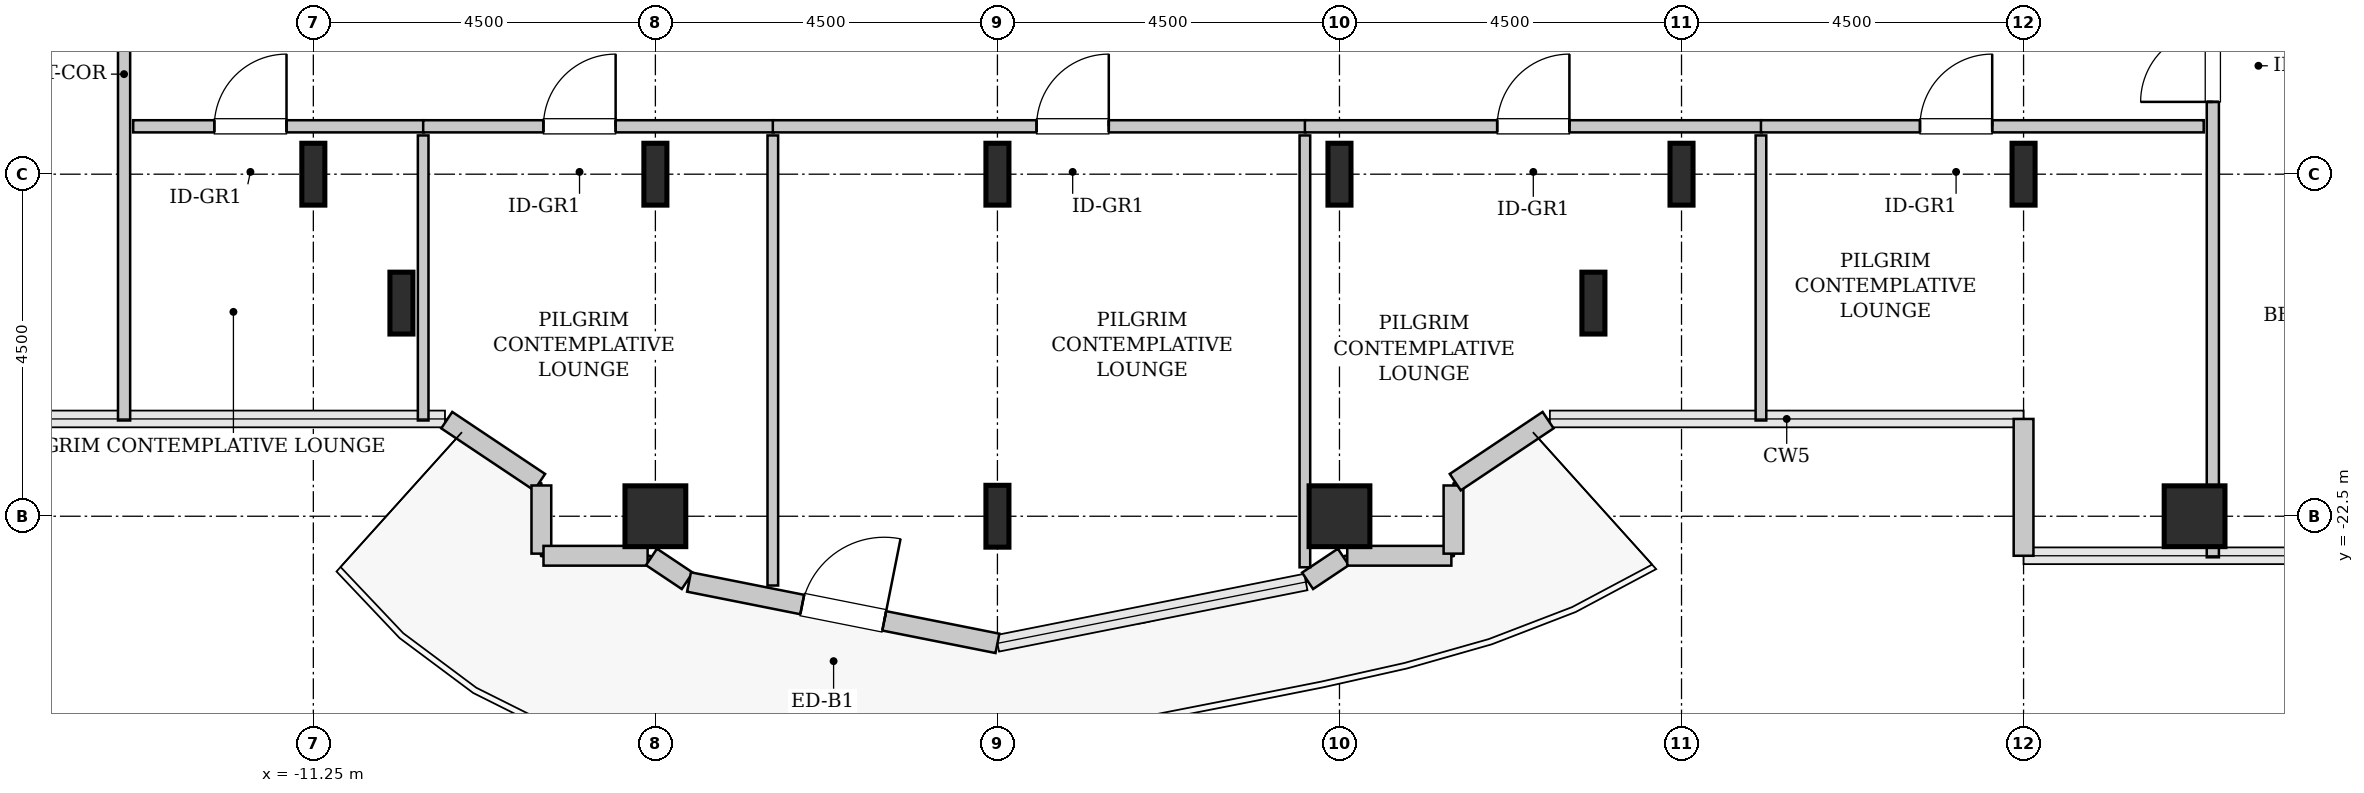
"""IFC4 building model, lengths in metres.
Left out: names, types, materials, properties, quantities, classifications, styles, units other than length and angle.
Written with IfcOpenShell. Run it as: python <this file> out.ifc"""

import sys

from ifc_helpers import new_model, si_unit, direction, frame, frame_2d, origin, origin_2d, place, context, subcontext, project, spatial, rectangle, hollow_rectangle, i_section, extrude, source, transform, mapped, element, fill, save


model = new_model("IFC4")
c1 = context("Model", 3, precision=1e-05, world=origin(), true_north=direction((0.0, 1.0)))
c2 = subcontext(c1, "Body", "Model", "MODEL_VIEW")
j1 = project(units=[si_unit("LENGTHUNIT", "METRE"), si_unit("PLANEANGLEUNIT", "RADIAN")], contexts=[c1])
p1 = place(None, origin())
s1 = spatial("IfcSite", under=j1, at=p1, CompositionType="ELEMENT")
p2 = place(p1, origin())
s2 = spatial("IfcBuilding", under=s1, at=p2, CompositionType="ELEMENT")
p3 = place(p2, frame((0.0, 0.0, 179.2)))
s3 = spatial("IfcBuildingStorey", under=s2, at=p3, CompositionType="ELEMENT", Elevation=179.2)
m1 = source(origin(), c2, "Body", "SweptSolid", [
    extrude(i_section(OverallWidth=0.303, OverallDepth=0.814, WebThickness=0.021, FlangeThickness=0.04, FilletRadius=0.03, at=origin_2d()), origin(), (0.0, 0.0, 1.0), 3.8),
])
for number, where, z_axis, x_axis in (
    (1, (-11.25, -18.0, 0.0), (0.0, 0.0, 1.0), (1.0, 0.0, 0.0)),
    (2, (-10.091, -19.696, 0.0), (0.0, 0.0, 1.0), (1.0, 0.0, 0.0)),
):
    element("IfcColumn", number, at=place(p3, frame(where, z_axis=z_axis, x_axis=x_axis)), inside=s3, PredefinedType="COLUMN", context=c2, shape_type="MappedRepresentation", body=[
        mapped(m1, transform((0.0, 0.0, 0.0), x_axis=(1.0, 0.0, 0.0), y_axis=(0.0, 1.0, 0.0), z_axis=(0.0, 0.0, 1.0), scale=1.0)),
    ])
m2 = source(origin(), c2, "Body", "SweptSolid", [
    extrude(hollow_rectangle(XDim=0.8, YDim=0.8, WallThickness=0.04, InnerFilletRadius=0.04, OuterFilletRadius=0.08, at=origin_2d()), origin(), (0.0, 0.0, 1.0), 3.8),
])
p4 = place(p3, frame((-6.75, -22.5, 0.0), z_axis=(0.0, 0.0, 1.0), x_axis=(1.0, 0.0, 0.0)))
e3 = element("IfcColumn", 3, at=p4, inside=s3, PredefinedType="COLUMN", context=c2, shape_type="MappedRepresentation", body=[
    mapped(m2, transform((0.0, 0.0, 0.0), x_axis=(1.0, 0.0, 0.0), y_axis=(0.0, 1.0, 0.0), z_axis=(0.0, 0.0, 1.0), scale=1.0)),
])
for number, where, z_axis, x_axis in (
    (4, (-6.75, -18.0, 0.0), (0.0, 0.0, 1.0), (1.0, 0.0, 0.0)),
    (5, (-2.25, -22.5, 0.0), (0.0, 0.0, 1.0), (1.0, 0.0, 0.0)),
    (6, (-2.25, -18.0, 0.0), (0.0, 0.0, 1.0), (1.0, 0.0, 0.0)),
):
    element("IfcColumn", number, at=place(p3, frame(where, z_axis=z_axis, x_axis=x_axis)), inside=s3, PredefinedType="COLUMN", context=c2, shape_type="MappedRepresentation", body=[
        mapped(m1, transform((0.0, 0.0, 0.0), x_axis=(1.0, 0.0, 0.0), y_axis=(0.0, 1.0, 0.0), z_axis=(0.0, 0.0, 1.0), scale=1.0)),
    ])
p5 = place(p3, frame((2.25, -22.5, 0.0), z_axis=(0.0, 0.0, 1.0), x_axis=(1.0, 0.0, 0.0)))
e7 = element("IfcColumn", 7, at=p5, inside=s3, PredefinedType="COLUMN", context=c2, shape_type="MappedRepresentation", body=[
    mapped(m2, transform((0.0, 0.0, 0.0), x_axis=(1.0, 0.0, 0.0), y_axis=(0.0, 1.0, 0.0), z_axis=(0.0, 0.0, 1.0), scale=1.0)),
])
for number, where, z_axis, x_axis in (
    (8, (2.25, -18.0, 0.0), (0.0, 0.0, 1.0), (1.0, 0.0, 0.0)),
    (9, (5.591, -19.696, 0.0), (0.0, 0.0, 1.0), (1.0, 0.0, 0.0)),
    (10, (6.75, -18.0, 0.0), (0.0, 0.0, 1.0), (1.0, 0.0, 0.0)),
    (11, (11.25, -18.0, 0.0), (0.0, 0.0, 1.0), (1.0, 0.0, 0.0)),
):
    element("IfcColumn", number, at=place(p3, frame(where, z_axis=z_axis, x_axis=x_axis)), inside=s3, PredefinedType="COLUMN", context=c2, shape_type="MappedRepresentation", body=[
        mapped(m1, transform((0.0, 0.0, 0.0), x_axis=(1.0, 0.0, 0.0), y_axis=(0.0, 1.0, 0.0), z_axis=(0.0, 0.0, 1.0), scale=1.0)),
    ])
p6 = place(p3, frame((13.5, -22.5, 0.0), z_axis=(0.0, 0.0, 1.0), x_axis=(1.0, 0.0, 0.0)))
e12 = element("IfcColumn", 12, at=p6, inside=s3, PredefinedType="COLUMN", context=c2, shape_type="MappedRepresentation", body=[
    mapped(m2, transform((0.0, 0.0, 0.0), x_axis=(1.0, 0.0, 0.0), y_axis=(0.0, 1.0, 0.0), z_axis=(0.0, 0.0, 1.0), scale=1.0)),
])
m3 = source(origin(), c2, "Body", "SweptSolid", [
    extrude(rectangle(XDim=1.8, YDim=0.26, at=frame_2d((0.9, 0.0))), origin(), (0.0, 0.0, 1.0), 3.55),
])
p7 = place(p3, frame((11.25, -21.22, 0.0), z_axis=(0.0, 0.0, 1.0), x_axis=(0.0, -1.0, 0.0)))
e13 = element("IfcWall", 13, at=p7, inside=s3, PredefinedType="SOLIDWALL", context=c2, shape_type="MappedRepresentation", body=[
    mapped(m3, transform((0.0, 0.0, 0.0), x_axis=(1.0, 0.0, 0.0), y_axis=(0.0, 1.0, 0.0), z_axis=(0.0, 0.0, 1.0), scale=1.0)),
])
m4 = source(origin(), c2, "Body", "SweptSolid", [
    extrude(rectangle(XDim=1.469, YDim=0.26, at=frame_2d((0.734, 0.0))), origin(), (0.0, 0.0, 1.0), 3.55),
])
p8 = place(p3, frame((-9.495, -21.236, 0.0), z_axis=(0.0, 0.0, 1.0), x_axis=(0.831461760506, -0.555581983884, 0.0)))
e14 = element("IfcWall", 14, at=p8, inside=s3, PredefinedType="SOLIDWALL", context=c2, shape_type="MappedRepresentation", body=[
    mapped(m4, transform((0.0, 0.0, 0.0), x_axis=(1.0, 0.0, 0.0), y_axis=(0.0, 1.0, 0.0), z_axis=(0.0, 0.0, 1.0), scale=1.0)),
])
m5 = source(origin(), c2, "Body", "SweptSolid", [
    extrude(rectangle(XDim=0.897, YDim=0.26, at=frame_2d((0.448, 0.0))), origin(), (0.0, 0.0, 1.0), 3.55),
])
p9 = place(p3, frame((-8.25, -22.095, 0.0), z_axis=(0.0, 0.0, 1.0), x_axis=(0.0, -1.0, 0.0)))
e15 = element("IfcWall", 15, at=p9, inside=s3, PredefinedType="SOLIDWALL", context=c2, shape_type="MappedRepresentation", body=[
    mapped(m5, transform((0.0, 0.0, 0.0), x_axis=(1.0, 0.0, 0.0), y_axis=(0.0, 1.0, 0.0), z_axis=(0.0, 0.0, 1.0), scale=1.0)),
])
m6 = source(origin(), c2, "Body", "SweptSolid", [
    extrude(rectangle(XDim=1.37, YDim=0.26, at=frame_2d((0.685, 0.0))), origin(), (0.0, 0.0, 1.0), 3.55),
])
p10 = place(p3, frame((-8.222, -23.02, 0.0), z_axis=(0.0, 0.0, 1.0), x_axis=(1.0, 0.0, 0.0)))
e16 = element("IfcWall", 16, at=p10, inside=s3, PredefinedType="SOLIDWALL", context=c2, shape_type="MappedRepresentation", body=[
    mapped(m6, transform((0.0, 0.0, 0.0), x_axis=(1.0, 0.0, 0.0), y_axis=(0.0, 1.0, 0.0), z_axis=(0.0, 0.0, 1.0), scale=1.0)),
])
m7 = source(origin(), c2, "Body", "SweptSolid", [
    extrude(rectangle(XDim=0.565, YDim=0.26, at=frame_2d((0.283, 0.0))), origin(), (0.0, 0.0, 1.0), 3.55),
])
p11 = place(p3, frame((-6.801, -23.036, 0.0), z_axis=(0.0, 0.0, 1.0), x_axis=(0.831651492666, -0.555297933317, 0.0)))
e17 = element("IfcWall", 17, at=p11, inside=s3, PredefinedType="SOLIDWALL", context=c2, shape_type="MappedRepresentation", body=[
    mapped(m7, transform((0.0, 0.0, 0.0), x_axis=(1.0, 0.0, 0.0), y_axis=(0.0, 1.0, 0.0), z_axis=(0.0, 0.0, 1.0), scale=1.0)),
])
m8 = source(origin(), c2, "Body", "SweptSolid", [
    extrude(rectangle(XDim=4.137, YDim=0.26, at=frame_2d((2.068, 0.0))), origin(), (0.0, 0.0, 1.0), 3.55),
])
p12 = place(p3, frame((-6.307, -23.365, 0.0), z_axis=(0.0, 0.0, 1.0), x_axis=(0.980782170794, -0.195105954428, 0.0)))
e18 = element("IfcWall", 18, at=p12, inside=s3, PredefinedType="SOLIDWALL", context=c2, shape_type="MappedRepresentation", body=[
    mapped(m8, transform((0.0, 0.0, 0.0), x_axis=(1.0, 0.0, 0.0), y_axis=(0.0, 1.0, 0.0), z_axis=(0.0, 0.0, 1.0), scale=1.0)),
])
p13 = place(p12, frame((1.518, 0.0, 0.0)))
e19 = element("IfcOpeningElement", 19, at=p13, cuts=e18, PredefinedType="OPENING", context=c2, shape_type="SweptSolid", body=[
    extrude(rectangle(XDim=1.1, YDim=2.2, at=frame_2d((0.55, 1.1))), frame((0.0, 0.14, 0.0), z_axis=(0.0, -1.0, 0.0), x_axis=(1.0, 0.0, 0.0)), (0.0, 0.0, 1.0), 0.28),
])
p14 = place(p3, frame((1.831, -23.35, 0.0), z_axis=(0.0, 0.0, 1.0), x_axis=(0.831651492666, 0.555297933317, 0.0)))
e20 = element("IfcWall", 20, at=p14, inside=s3, PredefinedType="SOLIDWALL", context=c2, shape_type="MappedRepresentation", body=[
    mapped(m7, transform((0.0, 0.0, 0.0), x_axis=(1.0, 0.0, 0.0), y_axis=(0.0, 1.0, 0.0), z_axis=(0.0, 0.0, 1.0), scale=1.0)),
])
p15 = place(p3, frame((2.352, -23.02, 0.0), z_axis=(0.0, 0.0, 1.0), x_axis=(1.0, 0.0, 0.0)))
e21 = element("IfcWall", 21, at=p15, inside=s3, PredefinedType="SOLIDWALL", context=c2, shape_type="MappedRepresentation", body=[
    mapped(m6, transform((0.0, 0.0, 0.0), x_axis=(1.0, 0.0, 0.0), y_axis=(0.0, 1.0, 0.0), z_axis=(0.0, 0.0, 1.0), scale=1.0)),
])
p16 = place(p3, frame((3.75, -22.992, 0.0), z_axis=(0.0, 0.0, 1.0), x_axis=(0.0, 1.0, 0.0)))
e22 = element("IfcWall", 22, at=p16, inside=s3, PredefinedType="SOLIDWALL", context=c2, shape_type="MappedRepresentation", body=[
    mapped(m5, transform((0.0, 0.0, 0.0), x_axis=(1.0, 0.0, 0.0), y_axis=(0.0, 1.0, 0.0), z_axis=(0.0, 0.0, 1.0), scale=1.0)),
])
p17 = place(p3, frame((3.773, -22.052, 0.0), z_axis=(0.0, 0.0, 1.0), x_axis=(0.831461760506, 0.555581983884, 0.0)))
e23 = element("IfcWall", 23, at=p17, inside=s3, PredefinedType="SOLIDWALL", context=c2, shape_type="MappedRepresentation", body=[
    mapped(m4, transform((0.0, 0.0, 0.0), x_axis=(1.0, 0.0, 0.0), y_axis=(0.0, 1.0, 0.0), z_axis=(0.0, 0.0, 1.0), scale=1.0)),
])
m9 = source(origin(), c2, "Body", "SweptSolid", [
    extrude(rectangle(XDim=15.245, YDim=0.16, at=frame_2d((7.623, 0.0))), origin(), (0.0, 0.0, 1.0), 3.535),
])
p18 = place(p3, frame((-13.74, -21.24, 0.0), z_axis=(0.0, 0.0, 1.0), x_axis=(0.0, 1.0, 0.0)))
e24 = element("IfcWall", 24, at=p18, inside=s3, PredefinedType="PARTITIONING", context=c2, shape_type="MappedRepresentation", body=[
    mapped(m9, transform((0.0, 0.0, 0.0), x_axis=(1.0, 0.0, 0.0), y_axis=(0.0, 1.0, 0.0), z_axis=(0.0, 0.0, 1.0), scale=1.0)),
])
p19 = place(p18, frame((9.062, 0.0, 0.0)))
e25 = element("IfcOpeningElement", 25, at=p19, cuts=e24, PredefinedType="OPENING", context=c2, shape_type="SweptSolid", body=[
    extrude(rectangle(XDim=0.95, YDim=2.1, at=frame_2d((0.475, 1.05))), frame((0.0, 0.09, 0.0), z_axis=(0.0, -1.0, 0.0), x_axis=(1.0, 0.0, 0.0)), (0.0, 0.0, 1.0), 0.18),
])
m10 = source(origin(), c2, "Body", "SweptSolid", [
    extrude(rectangle(XDim=7.302, YDim=0.16, at=frame_2d((3.651, 0.0))), origin(), (0.0, 0.0, 1.0), 3.535),
])
p20 = place(p3, frame((13.74, -23.04, 0.0), z_axis=(0.0, 0.0, 1.0), x_axis=(0.0, 1.0, 0.0)))
e26 = element("IfcWall", 26, at=p20, inside=s3, PredefinedType="PARTITIONING", context=c2, shape_type="MappedRepresentation", body=[
    mapped(m10, transform((0.0, 0.0, 0.0), x_axis=(1.0, 0.0, 0.0), y_axis=(0.0, 1.0, 0.0), z_axis=(0.0, 0.0, 1.0), scale=1.0)),
])
p21 = place(p20, frame((5.991, 0.0, 0.0)))
e27 = element("IfcOpeningElement", 27, at=p21, cuts=e26, PredefinedType="OPENING", context=c2, shape_type="SweptSolid", body=[
    extrude(rectangle(XDim=0.95, YDim=2.1, at=frame_2d((0.475, 1.05))), frame((0.0, 0.09, 0.0), z_axis=(0.0, -1.0, 0.0), x_axis=(1.0, 0.0, 0.0)), (0.0, 0.0, 1.0), 0.18),
])
m11 = source(origin(), c2, "Body", "SweptSolid", [
    extrude(rectangle(XDim=3.825, YDim=0.16, at=frame_2d((1.913, 0.0))), origin(), (0.0, 0.0, 1.0), 3.535),
])
p22 = place(p3, frame((-13.62, -17.37, 0.0), z_axis=(0.0, 0.0, 1.0), x_axis=(1.0, 0.0, 0.0)))
e28 = element("IfcWall", 28, at=p22, inside=s3, PredefinedType="PARTITIONING", context=c2, shape_type="MappedRepresentation", body=[
    mapped(m11, transform((0.0, 0.0, 0.0), x_axis=(1.0, 0.0, 0.0), y_axis=(0.0, 1.0, 0.0), z_axis=(0.0, 0.0, 1.0), scale=1.0)),
])
p23 = place(p22, frame((1.067, 0.0, 0.0)))
e29 = element("IfcOpeningElement", 29, at=p23, cuts=e28, PredefinedType="OPENING", context=c2, shape_type="SweptSolid", body=[
    extrude(rectangle(XDim=0.95, YDim=2.1, at=frame_2d((0.475, 1.05))), frame((0.0, 0.09, 0.0), z_axis=(0.0, -1.0, 0.0), x_axis=(1.0, 0.0, 0.0)), (0.0, 0.0, 1.0), 0.18),
])
m12 = source(origin(), c2, "Body", "SweptSolid", [
    extrude(rectangle(XDim=3.75, YDim=0.14, at=frame_2d((1.875, 0.0))), origin(), (0.0, 0.0, 1.0), 3.535),
])
p24 = place(p3, frame((-9.805, -21.24, 0.0), z_axis=(0.0, 0.0, 1.0), x_axis=(0.0, 1.0, 0.0)))
e30 = element("IfcWall", 30, at=p24, inside=s3, PredefinedType="PARTITIONING", context=c2, shape_type="MappedRepresentation", body=[
    mapped(m12, transform((0.0, 0.0, 0.0), x_axis=(1.0, 0.0, 0.0), y_axis=(0.0, 1.0, 0.0), z_axis=(0.0, 0.0, 1.0), scale=1.0)),
])
m13 = source(origin(), c2, "Body", "SweptSolid", [
    extrude(rectangle(XDim=4.61, YDim=0.16, at=frame_2d((2.305, 0.0))), origin(), (0.0, 0.0, 1.0), 3.535),
])
p25 = place(p3, frame((-9.805, -17.37, 0.0), z_axis=(0.0, 0.0, 1.0), x_axis=(1.0, 0.0, 0.0)))
e31 = element("IfcWall", 31, at=p25, inside=s3, PredefinedType="PARTITIONING", context=c2, shape_type="MappedRepresentation", body=[
    mapped(m13, transform((0.0, 0.0, 0.0), x_axis=(1.0, 0.0, 0.0), y_axis=(0.0, 1.0, 0.0), z_axis=(0.0, 0.0, 1.0), scale=1.0)),
])
p26 = place(p25, frame((1.582, 0.0, 0.0)))
e32 = element("IfcOpeningElement", 32, at=p26, cuts=e31, PredefinedType="OPENING", context=c2, shape_type="SweptSolid", body=[
    extrude(rectangle(XDim=0.95, YDim=2.1, at=frame_2d((0.475, 1.05))), frame((0.0, 0.09, 0.0), z_axis=(0.0, -1.0, 0.0), x_axis=(1.0, 0.0, 0.0)), (0.0, 0.0, 1.0), 0.18),
])
m14 = source(origin(), c2, "Body", "SweptSolid", [
    extrude(rectangle(XDim=5.922, YDim=0.14, at=frame_2d((2.961, 0.0))), origin(), (0.0, 0.0, 1.0), 3.535),
])
p27 = place(p3, frame((-5.205, -23.412, 0.0), z_axis=(0.0, 0.0, 1.0), x_axis=(0.0, 1.0, 0.0)))
e33 = element("IfcWall", 33, at=p27, inside=s3, PredefinedType="PARTITIONING", context=c2, shape_type="MappedRepresentation", body=[
    mapped(m14, transform((0.0, 0.0, 0.0), x_axis=(1.0, 0.0, 0.0), y_axis=(0.0, 1.0, 0.0), z_axis=(0.0, 0.0, 1.0), scale=1.0)),
])
m15 = source(origin(), c2, "Body", "SweptSolid", [
    extrude(rectangle(XDim=7.01, YDim=0.16, at=frame_2d((3.505, 0.0))), origin(), (0.0, 0.0, 1.0), 3.535),
])
p28 = place(p3, frame((-5.205, -17.37, 0.0), z_axis=(0.0, 0.0, 1.0), x_axis=(1.0, 0.0, 0.0)))
e34 = element("IfcWall", 34, at=p28, inside=s3, PredefinedType="PARTITIONING", context=c2, shape_type="MappedRepresentation", body=[
    mapped(m15, transform((0.0, 0.0, 0.0), x_axis=(1.0, 0.0, 0.0), y_axis=(0.0, 1.0, 0.0), z_axis=(0.0, 0.0, 1.0), scale=1.0)),
])
p29 = place(p28, frame((3.47, 0.0, 0.0)))
e35 = element("IfcOpeningElement", 35, at=p29, cuts=e34, PredefinedType="OPENING", context=c2, shape_type="SweptSolid", body=[
    extrude(rectangle(XDim=0.95, YDim=2.1, at=frame_2d((0.475, 1.05))), frame((0.0, 0.09, 0.0), z_axis=(0.0, -1.0, 0.0), x_axis=(1.0, 0.0, 0.0)), (0.0, 0.0, 1.0), 0.18),
])
m16 = source(origin(), c2, "Body", "SweptSolid", [
    extrude(rectangle(XDim=5.681, YDim=0.14, at=frame_2d((2.841, 0.0))), origin(), (0.0, 0.0, 1.0), 2.875),
])
p30 = place(p3, frame((1.795, -23.171, 0.0), z_axis=(0.0, 0.0, 1.0), x_axis=(0.0, 1.0, 0.0)))
e36 = element("IfcWall", 36, at=p30, inside=s3, PredefinedType="PARTITIONING", context=c2, shape_type="MappedRepresentation", body=[
    mapped(m16, transform((0.0, 0.0, 0.0), x_axis=(1.0, 0.0, 0.0), y_axis=(0.0, 1.0, 0.0), z_axis=(0.0, 0.0, 1.0), scale=1.0)),
])
m17 = source(origin(), c2, "Body", "SweptSolid", [
    extrude(rectangle(XDim=6.01, YDim=0.16, at=frame_2d((3.005, 0.0))), origin(), (0.0, 0.0, 1.0), 3.535),
])
p31 = place(p3, frame((1.795, -17.37, 0.0), z_axis=(0.0, 0.0, 1.0), x_axis=(1.0, 0.0, 0.0)))
e37 = element("IfcWall", 37, at=p31, inside=s3, PredefinedType="PARTITIONING", context=c2, shape_type="MappedRepresentation", body=[
    mapped(m17, transform((0.0, 0.0, 0.0), x_axis=(1.0, 0.0, 0.0), y_axis=(0.0, 1.0, 0.0), z_axis=(0.0, 0.0, 1.0), scale=1.0)),
])
p32 = place(p31, frame((2.53, 0.0, 0.0)))
e38 = element("IfcOpeningElement", 38, at=p32, cuts=e37, PredefinedType="OPENING", context=c2, shape_type="SweptSolid", body=[
    extrude(rectangle(XDim=0.95, YDim=2.1, at=frame_2d((0.475, 1.05))), frame((0.0, 0.09, 0.0), z_axis=(0.0, -1.0, 0.0), x_axis=(1.0, 0.0, 0.0)), (0.0, 0.0, 1.0), 0.18),
])
p33 = place(p3, frame((7.795, -21.24, 0.0), z_axis=(0.0, 0.0, 1.0), x_axis=(0.0, 1.0, 0.0)))
e39 = element("IfcWall", 39, at=p33, inside=s3, PredefinedType="PARTITIONING", context=c2, shape_type="MappedRepresentation", body=[
    mapped(m12, transform((0.0, 0.0, 0.0), x_axis=(1.0, 0.0, 0.0), y_axis=(0.0, 1.0, 0.0), z_axis=(0.0, 0.0, 1.0), scale=1.0)),
])
m18 = source(origin(), c2, "Body", "SweptSolid", [
    extrude(rectangle(XDim=5.825, YDim=0.16, at=frame_2d((2.913, 0.0))), origin(), (0.0, 0.0, 1.0), 3.535),
])
p34 = place(p3, frame((7.795, -17.37, 0.0), z_axis=(0.0, 0.0, 1.0), x_axis=(1.0, 0.0, 0.0)))
e40 = element("IfcWall", 40, at=p34, inside=s3, PredefinedType="PARTITIONING", context=c2, shape_type="MappedRepresentation", body=[
    mapped(m18, transform((0.0, 0.0, 0.0), x_axis=(1.0, 0.0, 0.0), y_axis=(0.0, 1.0, 0.0), z_axis=(0.0, 0.0, 1.0), scale=1.0)),
])
p35 = place(p34, frame((2.092, 0.0, 0.0)))
e41 = element("IfcOpeningElement", 41, at=p35, cuts=e40, PredefinedType="OPENING", context=c2, shape_type="SweptSolid", body=[
    extrude(rectangle(XDim=0.95, YDim=2.1, at=frame_2d((0.475, 1.05))), frame((0.0, 0.09, 0.0), z_axis=(0.0, -1.0, 0.0), x_axis=(1.0, 0.0, 0.0)), (0.0, 0.0, 1.0), 0.18),
])
m19 = source(origin(), c2, "Body", "SweptSolid", [
    extrude(rectangle(XDim=1.1, YDim=2.2, at=frame_2d((0.55, 1.1))), frame((0.0, 0.025, 0.0), z_axis=(0.0, -1.0, 0.0), x_axis=(1.0, 0.0, 0.0)), (0.0, 0.0, 1.0), 0.05),
])
p36 = place(p13, origin())
e42 = element("IfcDoor", 42, at=p36, inside=s3, OperationType="SINGLE_SWING_RIGHT", PredefinedType="DOOR", context=c2, shape_type="MappedRepresentation", body=[
    mapped(m19, transform((0.0, 0.0, 0.0), x_axis=(1.0, 0.0, 0.0), y_axis=(0.0, 1.0, 0.0), z_axis=(0.0, 0.0, 1.0), scale=1.0)),
])
fill(e19, e42)
m20 = source(origin(), c2, "Body", "SweptSolid", [
    extrude(rectangle(XDim=0.95, YDim=2.1, at=frame_2d((0.475, 1.05))), frame((0.0, 0.025, 0.0), z_axis=(0.0, -1.0, 0.0), x_axis=(1.0, 0.0, 0.0)), (0.0, 0.0, 1.0), 0.05),
])
p37 = place(p21, origin())
e43 = element("IfcDoor", 43, at=p37, inside=s3, OperationType="SINGLE_SWING_LEFT", PredefinedType="DOOR", context=c2, shape_type="MappedRepresentation", body=[
    mapped(m20, transform((0.0, 0.0, 0.0), x_axis=(1.0, 0.0, 0.0), y_axis=(0.0, 1.0, 0.0), z_axis=(0.0, 0.0, 1.0), scale=1.0)),
])
fill(e27, e43)
p38 = place(p23, origin())
e44 = element("IfcDoor", 44, at=p38, inside=s3, OperationType="SINGLE_SWING_RIGHT", PredefinedType="DOOR", context=c2, shape_type="MappedRepresentation", body=[
    mapped(m20, transform((0.0, 0.0, 0.0), x_axis=(1.0, 0.0, 0.0), y_axis=(0.0, 1.0, 0.0), z_axis=(0.0, 0.0, 1.0), scale=1.0)),
])
fill(e29, e44)
p39 = place(p26, origin())
e45 = element("IfcDoor", 45, at=p39, inside=s3, OperationType="SINGLE_SWING_RIGHT", PredefinedType="DOOR", context=c2, shape_type="MappedRepresentation", body=[
    mapped(m20, transform((0.0, 0.0, 0.0), x_axis=(1.0, 0.0, 0.0), y_axis=(0.0, 1.0, 0.0), z_axis=(0.0, 0.0, 1.0), scale=1.0)),
])
fill(e32, e45)
p40 = place(p29, origin())
e46 = element("IfcDoor", 46, at=p40, inside=s3, OperationType="SINGLE_SWING_RIGHT", PredefinedType="DOOR", context=c2, shape_type="MappedRepresentation", body=[
    mapped(m20, transform((0.0, 0.0, 0.0), x_axis=(1.0, 0.0, 0.0), y_axis=(0.0, 1.0, 0.0), z_axis=(0.0, 0.0, 1.0), scale=1.0)),
])
fill(e35, e46)
p41 = place(p32, origin())
e47 = element("IfcDoor", 47, at=p41, inside=s3, OperationType="SINGLE_SWING_RIGHT", PredefinedType="DOOR", context=c2, shape_type="MappedRepresentation", body=[
    mapped(m20, transform((0.0, 0.0, 0.0), x_axis=(1.0, 0.0, 0.0), y_axis=(0.0, 1.0, 0.0), z_axis=(0.0, 0.0, 1.0), scale=1.0)),
])
fill(e38, e47)
p42 = place(p35, origin())
e48 = element("IfcDoor", 48, at=p42, inside=s3, OperationType="SINGLE_SWING_RIGHT", PredefinedType="DOOR", context=c2, shape_type="MappedRepresentation", body=[
    mapped(m20, transform((0.0, 0.0, 0.0), x_axis=(1.0, 0.0, 0.0), y_axis=(0.0, 1.0, 0.0), z_axis=(0.0, 0.0, 1.0), scale=1.0)),
])
fill(e41, e48)
save(model, sys.argv[1])
